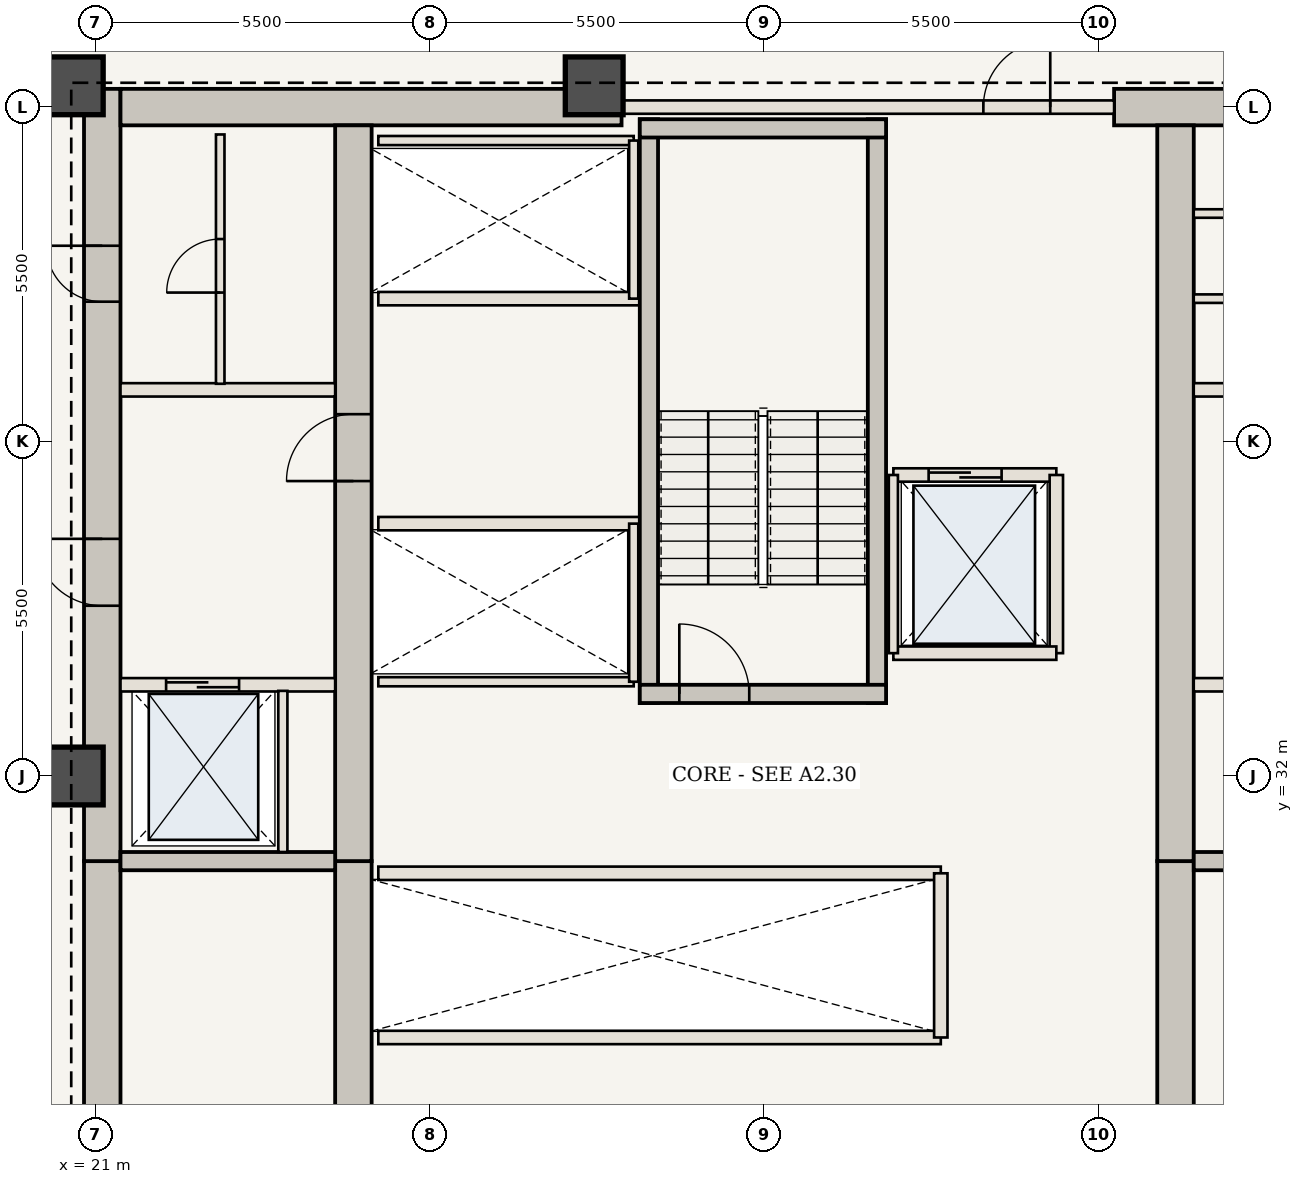
"""IFC4 building model, lengths in metres.
Left out: names, types, materials, properties, quantities, classifications, styles, units other than length and angle.
Written with IfcOpenShell. Run it as: python <this file> out.ifc"""

import sys

from ifc_helpers import new_model, si_unit, direction, frame, frame_2d, origin, origin_2d, place, context, subcontext, project, spatial, rectangle, extrude, element, fill, save


model = new_model("IFC4")
c1 = context("Model", 3, precision=1e-05, world=origin(), true_north=direction((0.0, 1.0)))
c2 = subcontext(c1, "Body", "Model", "MODEL_VIEW")
j1 = project(units=[si_unit("LENGTHUNIT", "METRE"), si_unit("PLANEANGLEUNIT", "RADIAN")], contexts=[c1])
p1 = place(None, origin())
s1 = spatial("IfcSite", under=j1, at=p1, CompositionType="ELEMENT")
p2 = place(p1, origin())
s2 = spatial("IfcBuilding", under=s1, at=p2, CompositionType="ELEMENT")
p3 = place(p2, frame((0.0, 0.0, 126.0)))
s3 = spatial("IfcBuildingStorey", under=s2, at=p3, CompositionType="ELEMENT", Elevation=126.0)
p4 = place(p3, frame((21.11, 20.65, 0.0), z_axis=(0.0, 0.0, 1.0), x_axis=(0.0, 1.0, 0.0)))
e1 = element("IfcWall", 1, at=p4, inside=s3, PredefinedType="SHEAR", context=c2, shape_type="SweptSolid", body=[
    extrude(rectangle(XDim=9.95, YDim=0.6, at=frame_2d((4.975, 0.0))), origin(), (0.0, 0.0, 1.0), 3.85),
])
p5 = place(p4, frame((1.1, 0.0, 0.0)))
e2 = element("IfcOpeningElement", 2, at=p5, cuts=e1, PredefinedType="OPENING", context=c2, shape_type="SweptSolid", body=[
    extrude(rectangle(XDim=1.15, YDim=2.15, at=frame_2d((0.575, 1.075))), frame((0.0, 0.31, 0.0), z_axis=(0.0, -1.0, 0.0), x_axis=(1.0, 0.0, 0.0)), (0.0, 0.0, 1.0), 0.62),
])
p6 = place(p3, frame((21.11, 30.6, 0.0), z_axis=(0.0, 0.0, 1.0), x_axis=(0.0, 1.0, 0.0)))
e3 = element("IfcWall", 3, at=p6, inside=s3, PredefinedType="SHEAR", context=c2, shape_type="SweptSolid", body=[
    extrude(rectangle(XDim=12.7, YDim=0.6, at=frame_2d((6.35, 0.0))), origin(), (0.0, 0.0, 1.0), 3.85),
])
p7 = place(p6, frame((4.2, 0.0, 0.0)))
e4 = element("IfcOpeningElement", 4, at=p7, cuts=e3, PredefinedType="OPENING", context=c2, shape_type="SweptSolid", body=[
    extrude(rectangle(XDim=1.1, YDim=2.15, at=frame_2d((0.55, 1.075))), frame((0.0, 0.31, 0.0), z_axis=(0.0, -1.0, 0.0), x_axis=(1.0, 0.0, 0.0)), (0.0, 0.0, 1.0), 0.62),
])
p8 = place(p6, frame((9.2, 0.0, 0.0)))
e5 = element("IfcOpeningElement", 5, at=p8, cuts=e3, PredefinedType="OPENING", context=c2, shape_type="SweptSolid", body=[
    extrude(rectangle(XDim=0.92, YDim=2.1, at=frame_2d((0.46, 1.05))), frame((0.0, 0.31, 0.0), z_axis=(0.0, -1.0, 0.0), x_axis=(1.0, 0.0, 0.0)), (0.0, 0.0, 1.0), 0.62),
])
p9 = place(p3, frame((21.41, 43.0, 0.0), z_axis=(0.0, 0.0, 1.0), x_axis=(1.0, 0.0, 0.0)))
e6 = element("IfcWall", 6, at=p9, inside=s3, PredefinedType="SHEAR", context=c2, shape_type="SweptSolid", body=[
    extrude(rectangle(XDim=8.24, YDim=0.6, at=frame_2d((4.12, 0.0))), origin(), (0.0, 0.0, 1.0), 3.85),
])
p10 = place(p3, frame((37.75, 43.0, 0.0), z_axis=(0.0, 0.0, 1.0), x_axis=(1.0, 0.0, 0.0)))
e7 = element("IfcWall", 7, at=p10, inside=s3, PredefinedType="SHEAR", context=c2, shape_type="SweptSolid", body=[
    extrude(rectangle(XDim=4.84, YDim=0.6, at=frame_2d((2.42, 0.0))), origin(), (0.0, 0.0, 1.0), 3.85),
])
p11 = place(p3, frame((25.24, 21.25, 0.0), z_axis=(0.0, 0.0, 1.0), x_axis=(0.0, 1.0, 0.0)))
e8 = element("IfcWall", 8, at=p11, inside=s3, PredefinedType="SHEAR", context=c2, shape_type="SweptSolid", body=[
    extrude(rectangle(XDim=9.35, YDim=0.6, at=frame_2d((4.675, 0.0))), origin(), (0.0, 0.0, 1.0), 3.85),
])
p12 = place(p3, frame((25.24, 30.6, 0.0), z_axis=(0.0, 0.0, 1.0), x_axis=(0.0, 1.0, 0.0)))
e9 = element("IfcWall", 9, at=p12, inside=s3, PredefinedType="SHEAR", context=c2, shape_type="SweptSolid", body=[
    extrude(rectangle(XDim=12.1, YDim=0.6, at=frame_2d((6.05, 0.0))), origin(), (0.0, 0.0, 1.0), 3.85),
])
p13 = place(p12, frame((6.25, 0.0, 0.0)))
e10 = element("IfcOpeningElement", 10, at=p13, cuts=e9, PredefinedType="OPENING", context=c2, shape_type="SweptSolid", body=[
    extrude(rectangle(XDim=1.1, YDim=2.15, at=frame_2d((0.55, 1.075))), frame((0.0, 0.31, 0.0), z_axis=(0.0, -1.0, 0.0), x_axis=(1.0, 0.0, 0.0)), (0.0, 0.0, 1.0), 0.62),
])
p14 = place(p3, frame((38.76, 21.25, 0.0), z_axis=(0.0, 0.0, 1.0), x_axis=(0.0, 1.0, 0.0)))
e11 = element("IfcWall", 11, at=p14, inside=s3, PredefinedType="SHEAR", context=c2, shape_type="SweptSolid", body=[
    extrude(rectangle(XDim=9.35, YDim=0.6, at=frame_2d((4.675, 0.0))), origin(), (0.0, 0.0, 1.0), 3.85),
])
p15 = place(p3, frame((38.76, 30.6, 0.0), z_axis=(0.0, 0.0, 1.0), x_axis=(0.0, 1.0, 0.0)))
e12 = element("IfcWall", 12, at=p15, inside=s3, PredefinedType="SHEAR", context=c2, shape_type="SweptSolid", body=[
    extrude(rectangle(XDim=12.1, YDim=0.6, at=frame_2d((6.05, 0.0))), origin(), (0.0, 0.0, 1.0), 3.85),
])
for number, where, z_axis, x_axis in (
    (13, (29.2, 43.35, 0.0), (0.0, 0.0, 1.0), (1.0, 0.0, 0.0)),
    (14, (20.65, 43.35, 0.0), (0.0, 0.0, 1.0), (1.0, 0.0, 0.0)),
    (15, (20.65, 32.0, 0.0), (0.0, 0.0, 1.0), (1.0, 0.0, 0.0)),
):
    element("IfcColumn", number, at=place(p3, frame(where, z_axis=z_axis, x_axis=x_axis)), inside=s3, PredefinedType="COLUMN", context=c2, shape_type="SweptSolid", body=[
        extrude(rectangle(XDim=0.95, YDim=0.95, at=origin_2d()), origin(), (0.0, 0.0, 1.0), 3.85),
    ])
for number, where, z_axis, x_axis in (
    (16, (21.41, 30.6, 0.0), (0.0, 0.0, 1.0), (1.0, 0.0, 0.0)),
    (17, (39.06, 30.6, 0.0), (0.0, 0.0, 1.0), (1.0, 0.0, 0.0)),
):
    element("IfcWall", number, at=place(p3, frame(where, z_axis=z_axis, x_axis=x_axis)), inside=s3, PredefinedType="SHEAR", context=c2, shape_type="SweptSolid", body=[
        extrude(rectangle(XDim=3.53, YDim=0.3, at=frame_2d((1.765, 0.0))), origin(), (0.0, 0.0, 1.0), 3.685),
    ])
p16 = place(p3, frame((21.41, 33.5, 0.0), z_axis=(0.0, 0.0, 1.0), x_axis=(1.0, 0.0, 0.0)))
e18 = element("IfcWall", 18, at=p16, inside=s3, PredefinedType="STANDARD", context=c2, shape_type="SweptSolid", body=[
    extrude(rectangle(XDim=3.53, YDim=0.22, at=frame_2d((1.765, 0.0))), origin(), (0.0, 0.0, 1.0), 3.685),
])
p17 = place(p16, frame((0.75, 0.0, 0.0)))
e19 = element("IfcOpeningElement", 19, at=p17, cuts=e18, PredefinedType="OPENING", context=c2, shape_type="SweptSolid", body=[
    extrude(rectangle(XDim=1.2, YDim=2.2, at=frame_2d((0.6, 1.1))), frame((0.0, 0.12, 0.0), z_axis=(0.0, -1.0, 0.0), x_axis=(1.0, 0.0, 0.0)), (0.0, 0.0, 1.0), 0.24),
])
p18 = place(p3, frame((24.08, 30.75, 0.0), z_axis=(0.0, 0.0, 1.0), x_axis=(0.0, 1.0, 0.0)))
e20 = element("IfcWall", 20, at=p18, inside=s3, PredefinedType="STANDARD", context=c2, shape_type="SweptSolid", body=[
    extrude(rectangle(XDim=2.65, YDim=0.15, at=frame_2d((1.325, 0.0))), origin(), (0.0, 0.0, 1.0), 3.685),
])
p19 = place(p3, frame((39.06, 33.5, 0.0), z_axis=(0.0, 0.0, 1.0), x_axis=(1.0, 0.0, 0.0)))
e21 = element("IfcWall", 21, at=p19, inside=s3, PredefinedType="STANDARD", context=c2, shape_type="SweptSolid", body=[
    extrude(rectangle(XDim=3.53, YDim=0.22, at=frame_2d((1.765, 0.0))), origin(), (0.0, 0.0, 1.0), 3.685),
])
p20 = place(p19, frame((1.55, 0.0, 0.0)))
e22 = element("IfcOpeningElement", 22, at=p20, cuts=e21, PredefinedType="OPENING", context=c2, shape_type="SweptSolid", body=[
    extrude(rectangle(XDim=1.2, YDim=2.2, at=frame_2d((0.6, 1.1))), frame((0.0, 0.12, 0.0), z_axis=(0.0, -1.0, 0.0), x_axis=(1.0, 0.0, 0.0)), (0.0, 0.0, 1.0), 0.24),
])
for number, where, z_axis, x_axis in (
    (23, (21.41, 38.35, 0.0), (0.0, 0.0, 1.0), (1.0, 0.0, 0.0)),
    (24, (39.06, 38.35, 0.0), (0.0, 0.0, 1.0), (1.0, 0.0, 0.0)),
):
    element("IfcWall", number, at=place(p3, frame(where, z_axis=z_axis, x_axis=x_axis)), inside=s3, PredefinedType="STANDARD", context=c2, shape_type="SweptSolid", body=[
        extrude(rectangle(XDim=3.53, YDim=0.22, at=frame_2d((1.765, 0.0))), origin(), (0.0, 0.0, 1.0), 3.685),
    ])
p21 = place(p3, frame((23.05, 38.45, 0.0), z_axis=(0.0, 0.0, 1.0), x_axis=(0.0, 1.0, 0.0)))
e25 = element("IfcWall", 25, at=p21, inside=s3, PredefinedType="STANDARD", context=c2, shape_type="SweptSolid", body=[
    extrude(rectangle(XDim=4.1, YDim=0.14, at=frame_2d((2.05, 0.0))), origin(), (0.0, 0.0, 1.0), 3.685),
])
p22 = place(p21, frame((1.5, 0.0, 0.0)))
e26 = element("IfcOpeningElement", 26, at=p22, cuts=e25, PredefinedType="OPENING", context=c2, shape_type="SweptSolid", body=[
    extrude(rectangle(XDim=0.88, YDim=2.1, at=frame_2d((0.44, 1.05))), frame((0.0, 0.08, 0.0), z_axis=(0.0, -1.0, 0.0), x_axis=(1.0, 0.0, 0.0)), (0.0, 0.0, 1.0), 0.16),
])
for number, where, z_axis, x_axis in (
    (27, (39.06, 39.85, 0.0), (0.0, 0.0, 1.0), (1.0, 0.0, 0.0)),
    (28, (39.06, 41.25, 0.0), (0.0, 0.0, 1.0), (1.0, 0.0, 0.0)),
):
    element("IfcWall", number, at=place(p3, frame(where, z_axis=z_axis, x_axis=x_axis)), inside=s3, PredefinedType="STANDARD", context=c2, shape_type="SweptSolid", body=[
        extrude(rectangle(XDim=3.53, YDim=0.14, at=frame_2d((1.765, 0.0))), origin(), (0.0, 0.0, 1.0), 3.685),
    ])
for number, where, z_axis, x_axis in (
    (29, (25.65, 27.7, 0.0), (0.0, 0.0, 1.0), (1.0, 0.0, 0.0)),
    (30, (25.65, 30.4, 0.0), (0.0, 0.0, 1.0), (1.0, 0.0, 0.0)),
):
    element("IfcWall", number, at=place(p3, frame(where, z_axis=z_axis, x_axis=x_axis)), inside=s3, PredefinedType="STANDARD", context=c2, shape_type="SweptSolid", body=[
        extrude(rectangle(XDim=9.25, YDim=0.22, at=frame_2d((4.625, 0.0))), origin(), (0.0, 0.0, 1.0), 3.685),
    ])
p23 = place(p3, frame((34.9, 27.7, 0.0), z_axis=(0.0, 0.0, 1.0), x_axis=(0.0, 1.0, 0.0)))
e31 = element("IfcWall", 31, at=p23, inside=s3, PredefinedType="STANDARD", context=c2, shape_type="SweptSolid", body=[
    extrude(rectangle(XDim=2.7, YDim=0.22, at=frame_2d((1.35, 0.0))), origin(), (0.0, 0.0, 1.0), 3.685),
])
p24 = place(p3, frame((25.65, 36.15, 0.0), z_axis=(0.0, 0.0, 1.0), x_axis=(1.0, 0.0, 0.0)))
e32 = element("IfcWall", 32, at=p24, inside=s3, PredefinedType="STANDARD", context=c2, shape_type="SweptSolid", body=[
    extrude(rectangle(XDim=4.3, YDim=0.22, at=frame_2d((2.15, 0.0))), origin(), (0.0, 0.0, 1.0), 3.685),
])
p25 = place(p3, frame((25.65, 33.55, 0.0), z_axis=(0.0, 0.0, 1.0), x_axis=(1.0, 0.0, 0.0)))
e33 = element("IfcWall", 33, at=p25, inside=s3, PredefinedType="STANDARD", context=c2, shape_type="SweptSolid", body=[
    extrude(rectangle(XDim=4.2, YDim=0.15, at=frame_2d((2.1, 0.0))), origin(), (0.0, 0.0, 1.0), 3.685),
])
p26 = place(p3, frame((29.85, 33.55, 0.0), z_axis=(0.0, 0.0, 1.0), x_axis=(0.0, 1.0, 0.0)))
e34 = element("IfcWall", 34, at=p26, inside=s3, PredefinedType="STANDARD", context=c2, shape_type="SweptSolid", body=[
    extrude(rectangle(XDim=2.6, YDim=0.15, at=frame_2d((1.3, 0.0))), origin(), (0.0, 0.0, 1.0), 3.685),
])
p27 = place(p3, frame((25.65, 39.85, 0.0), z_axis=(0.0, 0.0, 1.0), x_axis=(1.0, 0.0, 0.0)))
e35 = element("IfcWall", 35, at=p27, inside=s3, PredefinedType="STANDARD", context=c2, shape_type="SweptSolid", body=[
    extrude(rectangle(XDim=4.3, YDim=0.22, at=frame_2d((2.15, 0.0))), origin(), (0.0, 0.0, 1.0), 3.685),
])
p28 = place(p3, frame((25.65, 42.45, 0.0), z_axis=(0.0, 0.0, 1.0), x_axis=(1.0, 0.0, 0.0)))
e36 = element("IfcWall", 36, at=p28, inside=s3, PredefinedType="STANDARD", context=c2, shape_type="SweptSolid", body=[
    extrude(rectangle(XDim=4.2, YDim=0.15, at=frame_2d((2.1, 0.0))), origin(), (0.0, 0.0, 1.0), 3.685),
])
p29 = place(p3, frame((29.85, 39.85, 0.0), z_axis=(0.0, 0.0, 1.0), x_axis=(0.0, 1.0, 0.0)))
e37 = element("IfcWall", 37, at=p29, inside=s3, PredefinedType="STANDARD", context=c2, shape_type="SweptSolid", body=[
    extrude(rectangle(XDim=2.6, YDim=0.15, at=frame_2d((1.3, 0.0))), origin(), (0.0, 0.0, 1.0), 3.685),
])
for number, where, z_axis, x_axis in (
    (38, (30.1, 33.2, 0.0), (0.0, 0.0, 1.0), (0.0, 1.0, 0.0)),
    (39, (33.85, 33.2, 0.0), (0.0, 0.0, 1.0), (0.0, 1.0, 0.0)),
):
    element("IfcWall", number, at=place(p3, frame(where, z_axis=z_axis, x_axis=x_axis)), inside=s3, PredefinedType="SHEAR", context=c2, shape_type="SweptSolid", body=[
        extrude(rectangle(XDim=9.6, YDim=0.3, at=frame_2d((4.8, 0.0))), origin(), (0.0, 0.0, 1.0), 3.685),
    ])
p30 = place(p3, frame((29.95, 33.35, 0.0), z_axis=(0.0, 0.0, 1.0), x_axis=(1.0, 0.0, 0.0)))
e40 = element("IfcWall", 40, at=p30, inside=s3, PredefinedType="SHEAR", context=c2, shape_type="SweptSolid", body=[
    extrude(rectangle(XDim=4.05, YDim=0.3, at=frame_2d((2.025, 0.0))), origin(), (0.0, 0.0, 1.0), 3.685),
])
p31 = place(p30, frame((0.65, 0.0, 0.0)))
e41 = element("IfcOpeningElement", 41, at=p31, cuts=e40, PredefinedType="OPENING", context=c2, shape_type="SweptSolid", body=[
    extrude(rectangle(XDim=1.15, YDim=2.15, at=frame_2d((0.575, 1.075))), frame((0.0, 0.16, 0.0), z_axis=(0.0, -1.0, 0.0), x_axis=(1.0, 0.0, 0.0)), (0.0, 0.0, 1.0), 0.32),
])
p32 = place(p3, frame((29.95, 42.65, 0.0), z_axis=(0.0, 0.0, 1.0), x_axis=(1.0, 0.0, 0.0)))
e42 = element("IfcWall", 42, at=p32, inside=s3, PredefinedType="SHEAR", context=c2, shape_type="SweptSolid", body=[
    extrude(rectangle(XDim=4.05, YDim=0.3, at=frame_2d((2.025, 0.0))), origin(), (0.0, 0.0, 1.0), 3.685),
])
p33 = place(p3, frame((29.65, 43.0, 0.0), z_axis=(0.0, 0.0, 1.0), x_axis=(1.0, 0.0, 0.0)))
e43 = element("IfcWall", 43, at=p33, inside=s3, PredefinedType="STANDARD", context=c2, shape_type="SweptSolid", body=[
    extrude(rectangle(XDim=8.1, YDim=0.22, at=frame_2d((4.05, 0.0))), origin(), (0.0, 0.0, 1.0), 3.685),
])
p34 = place(p33, frame((5.95, 0.0, 0.0)))
e44 = element("IfcOpeningElement", 44, at=p34, cuts=e43, PredefinedType="OPENING", context=c2, shape_type="SweptSolid", body=[
    extrude(rectangle(XDim=1.1, YDim=2.15, at=frame_2d((0.55, 1.075))), frame((0.0, 0.12, 0.0), z_axis=(0.0, -1.0, 0.0), x_axis=(1.0, 0.0, 0.0)), (0.0, 0.0, 1.0), 0.24),
])
p35 = place(p3, frame((34.12, 36.95, 0.0), z_axis=(0.0, 0.0, 1.0), x_axis=(1.0, 0.0, 0.0)))
e45 = element("IfcWall", 45, at=p35, inside=s3, PredefinedType="STANDARD", context=c2, shape_type="SweptSolid", body=[
    extrude(rectangle(XDim=2.68, YDim=0.22, at=frame_2d((1.34, 0.0))), origin(), (0.0, 0.0, 1.0), 3.685),
])
p36 = place(p35, frame((0.58, 0.0, 0.0)))
e46 = element("IfcOpeningElement", 46, at=p36, cuts=e45, PredefinedType="OPENING", context=c2, shape_type="SweptSolid", body=[
    extrude(rectangle(XDim=1.2, YDim=2.2, at=frame_2d((0.6, 1.1))), frame((0.0, 0.12, 0.0), z_axis=(0.0, -1.0, 0.0), x_axis=(1.0, 0.0, 0.0)), (0.0, 0.0, 1.0), 0.24),
])
p37 = place(p3, frame((36.8, 34.02, 0.0), z_axis=(0.0, 0.0, 1.0), x_axis=(0.0, 1.0, 0.0)))
e47 = element("IfcWall", 47, at=p37, inside=s3, PredefinedType="STANDARD", context=c2, shape_type="SweptSolid", body=[
    extrude(rectangle(XDim=2.93, YDim=0.22, at=frame_2d((1.465, 0.0))), origin(), (0.0, 0.0, 1.0), 3.685),
])
p38 = place(p3, frame((34.12, 34.02, 0.0), z_axis=(0.0, 0.0, 1.0), x_axis=(1.0, 0.0, 0.0)))
e48 = element("IfcWall", 48, at=p38, inside=s3, PredefinedType="STANDARD", context=c2, shape_type="SweptSolid", body=[
    extrude(rectangle(XDim=2.68, YDim=0.22, at=frame_2d((1.34, 0.0))), origin(), (0.0, 0.0, 1.0), 3.685),
])
p39 = place(p3, frame((34.12, 34.02, 0.0), z_axis=(0.0, 0.0, 1.0), x_axis=(0.0, 1.0, 0.0)))
e49 = element("IfcWall", 49, at=p39, inside=s3, PredefinedType="STANDARD", context=c2, shape_type="SweptSolid", body=[
    extrude(rectangle(XDim=2.93, YDim=0.15, at=frame_2d((1.465, 0.0))), origin(), (0.0, 0.0, 1.0), 3.685),
])
p40 = place(p7, origin())
e50 = element("IfcDoor", 50, at=p40, inside=s3, OperationType="SINGLE_SWING_RIGHT", PredefinedType="DOOR", context=c2, shape_type="SweptSolid", body=[
    extrude(rectangle(XDim=1.1, YDim=2.15, at=frame_2d((0.55, 1.075))), frame((0.0, 0.025, 0.0), z_axis=(0.0, -1.0, 0.0), x_axis=(1.0, 0.0, 0.0)), (0.0, 0.0, 1.0), 0.05),
])
fill(e4, e50)
p41 = place(p13, origin())
e51 = element("IfcDoor", 51, at=p41, inside=s3, OperationType="SINGLE_SWING_LEFT", PredefinedType="DOOR", context=c2, shape_type="SweptSolid", body=[
    extrude(rectangle(XDim=1.1, YDim=2.15, at=frame_2d((0.55, 1.075))), frame((0.0, 0.025, 0.0), z_axis=(0.0, -1.0, 0.0), x_axis=(1.0, 0.0, 0.0)), (0.0, 0.0, 1.0), 0.05),
])
fill(e10, e51)
p42 = place(p8, origin())
e52 = element("IfcDoor", 52, at=p42, inside=s3, OperationType="SINGLE_SWING_RIGHT", PredefinedType="DOOR", context=c2, shape_type="SweptSolid", body=[
    extrude(rectangle(XDim=0.92, YDim=2.1, at=frame_2d((0.46, 1.05))), frame((0.0, 0.025, 0.0), z_axis=(0.0, -1.0, 0.0), x_axis=(1.0, 0.0, 0.0)), (0.0, 0.0, 1.0), 0.05),
])
fill(e5, e52)
p43 = place(p17, origin())
e53 = element("IfcDoor", 53, at=p43, inside=s3, OperationType="DOUBLE_DOOR_SLIDING", PredefinedType="DOOR", context=c2, shape_type="SweptSolid", body=[
    extrude(rectangle(XDim=1.2, YDim=2.2, at=frame_2d((0.6, 1.1))), frame((0.0, 0.025, 0.0), z_axis=(0.0, -1.0, 0.0), x_axis=(1.0, 0.0, 0.0)), (0.0, 0.0, 1.0), 0.05),
])
fill(e19, e53)
p44 = place(p22, origin())
e54 = element("IfcDoor", 54, at=p44, inside=s3, OperationType="SINGLE_SWING_LEFT", PredefinedType="DOOR", context=c2, shape_type="SweptSolid", body=[
    extrude(rectangle(XDim=0.88, YDim=2.1, at=frame_2d((0.44, 1.05))), frame((0.0, 0.025, 0.0), z_axis=(0.0, -1.0, 0.0), x_axis=(1.0, 0.0, 0.0)), (0.0, 0.0, 1.0), 0.05),
])
fill(e26, e54)
p45 = place(p31, origin())
e55 = element("IfcDoor", 55, at=p45, inside=s3, OperationType="SINGLE_SWING_LEFT", PredefinedType="DOOR", context=c2, shape_type="SweptSolid", body=[
    extrude(rectangle(XDim=1.15, YDim=2.15, at=frame_2d((0.575, 1.075))), frame((0.0, 0.025, 0.0), z_axis=(0.0, -1.0, 0.0), x_axis=(1.0, 0.0, 0.0)), (0.0, 0.0, 1.0), 0.05),
])
fill(e41, e55)
p46 = place(p34, origin())
e56 = element("IfcDoor", 56, at=p46, inside=s3, OperationType="SINGLE_SWING_RIGHT", PredefinedType="DOOR", context=c2, shape_type="SweptSolid", body=[
    extrude(rectangle(XDim=1.1, YDim=2.15, at=frame_2d((0.55, 1.075))), frame((0.0, 0.025, 0.0), z_axis=(0.0, -1.0, 0.0), x_axis=(1.0, 0.0, 0.0)), (0.0, 0.0, 1.0), 0.05),
])
fill(e44, e56)
p47 = place(p36, origin())
e57 = element("IfcDoor", 57, at=p47, inside=s3, OperationType="DOUBLE_DOOR_SLIDING", PredefinedType="DOOR", context=c2, shape_type="SweptSolid", body=[
    extrude(rectangle(XDim=1.2, YDim=2.2, at=frame_2d((0.6, 1.1))), frame((0.0, 0.025, 0.0), z_axis=(0.0, -1.0, 0.0), x_axis=(1.0, 0.0, 0.0)), (0.0, 0.0, 1.0), 0.05),
])
fill(e46, e57)
save(model, sys.argv[1])
